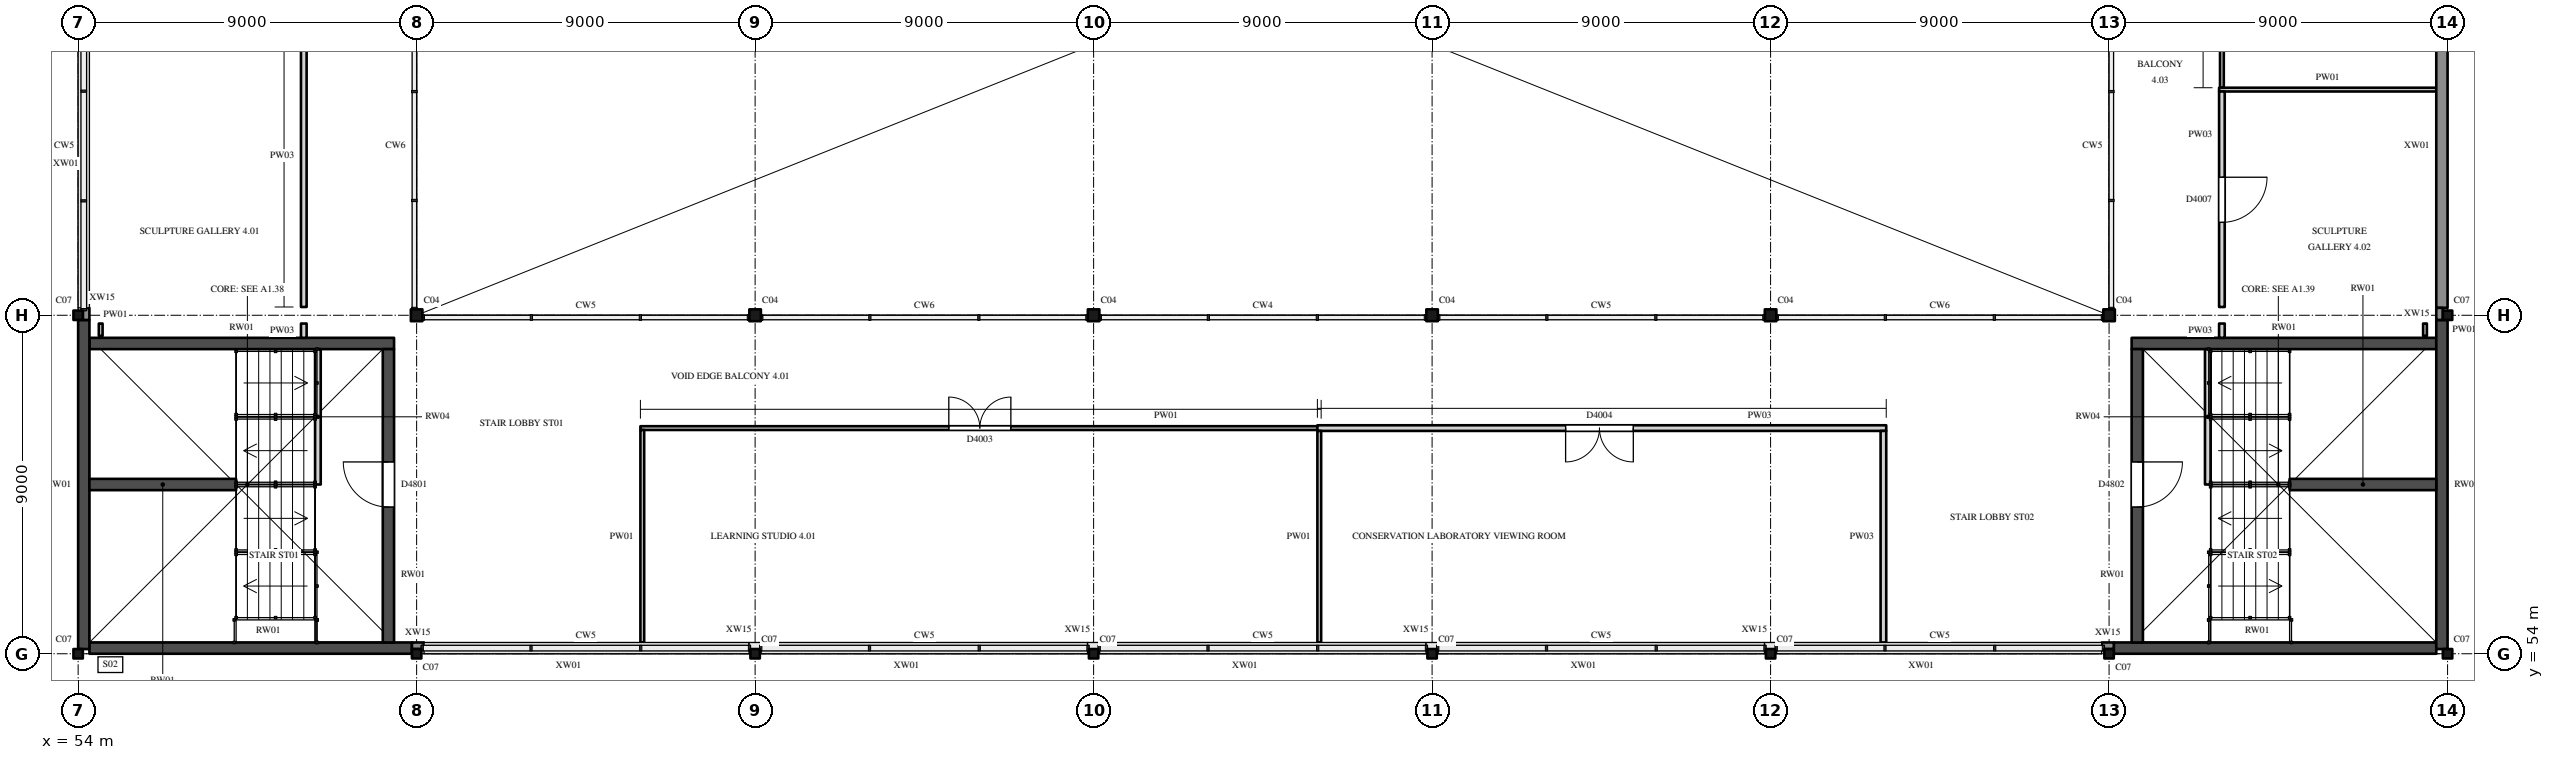
"""IFC4 building model, lengths in metres.
Left out: names, types, materials, properties, quantities, classifications, styles, units other than length and angle.
Written with IfcOpenShell. Run it as: python <this file> out.ifc"""

import sys

from ifc_helpers import new_model, si_unit, direction, frame, frame_2d, origin, origin_2d, place, context, subcontext, project, spatial, rectangle, hollow_rectangle, i_section, extrude, element, fill, save


model = new_model("IFC4")
c1 = context("Model", 3, precision=1e-05, world=origin(), true_north=direction((0.0, 1.0)))
c2 = subcontext(c1, "Body", "Model", "MODEL_VIEW")
j1 = project(units=[si_unit("LENGTHUNIT", "METRE"), si_unit("PLANEANGLEUNIT", "RADIAN")], contexts=[c1])
p1 = place(None, origin())
s1 = spatial("IfcSite", under=j1, at=p1, CompositionType="ELEMENT")
p2 = place(p1, origin())
s2 = spatial("IfcBuilding", under=s1, at=p2, CompositionType="ELEMENT")
p3 = place(p2, frame((0.0, 0.0, 26.0)))
s3 = spatial("IfcBuildingStorey", under=s2, at=p3, CompositionType="ELEMENT", Elevation=26.0)
for number, where, z_axis, x_axis in (
    (1, (54.0, 54.0, 0.0), (0.0, 0.0, 1.0), (1.0, 0.0, 0.0)),
    (2, (63.0, 54.0, 0.0), (0.0, 0.0, 1.0), (1.0, 0.0, 0.0)),
    (3, (72.0, 54.0, 0.0), (0.0, 0.0, 1.0), (1.0, 0.0, 0.0)),
    (4, (81.0, 54.0, 0.0), (0.0, 0.0, 1.0), (1.0, 0.0, 0.0)),
    (5, (90.0, 54.0, 0.0), (0.0, 0.0, 1.0), (1.0, 0.0, 0.0)),
    (6, (99.0, 54.0, 0.0), (0.0, 0.0, 1.0), (1.0, 0.0, 0.0)),
    (7, (108.0, 54.0, 0.0), (0.0, 0.0, 1.0), (1.0, 0.0, 0.0)),
    (8, (117.0, 54.0, 0.0), (0.0, 0.0, 1.0), (1.0, 0.0, 0.0)),
    (9, (54.0, 63.0, 0.0), (0.0, 0.0, 1.0), (1.0, 0.0, 0.0)),
):
    element("IfcColumn", number, at=place(p3, frame(where, z_axis=z_axis, x_axis=x_axis)), inside=s3, PredefinedType="COLUMN", context=c2, shape_type="SweptSolid", body=[
        extrude(hollow_rectangle(XDim=0.25, YDim=0.25, WallThickness=0.009, InnerFilletRadius=0.013, OuterFilletRadius=0.022, at=origin_2d()), origin(), (0.0, 0.0, 1.0), 5.0),
    ])
for number, where, z_axis, x_axis in (
    (10, (63.0, 63.0, 0.0), (0.0, 0.0, 1.0), (1.0, 0.0, 0.0)),
    (11, (72.0, 63.0, 0.0), (0.0, 0.0, 1.0), (1.0, 0.0, 0.0)),
    (12, (81.0, 63.0, 0.0), (0.0, 0.0, 1.0), (1.0, 0.0, 0.0)),
    (13, (90.0, 63.0, 0.0), (0.0, 0.0, 1.0), (1.0, 0.0, 0.0)),
    (14, (99.0, 63.0, 0.0), (0.0, 0.0, 1.0), (1.0, 0.0, 0.0)),
    (15, (108.0, 63.0, 0.0), (0.0, 0.0, 1.0), (1.0, 0.0, 0.0)),
):
    element("IfcColumn", number, at=place(p3, frame(where, z_axis=z_axis, x_axis=x_axis)), inside=s3, PredefinedType="COLUMN", context=c2, shape_type="SweptSolid", body=[
        extrude(i_section(OverallWidth=0.307, OverallDepth=0.315, WebThickness=0.012, FlangeThickness=0.019, FilletRadius=0.017, at=origin_2d()), origin(), (0.0, 0.0, 1.0), 5.0),
    ])
p4 = place(p3, frame((117.0, 63.0, 0.0), z_axis=(0.0, 0.0, 1.0), x_axis=(1.0, 0.0, 0.0)))
e16 = element("IfcColumn", 16, at=p4, inside=s3, PredefinedType="COLUMN", context=c2, shape_type="SweptSolid", body=[
    extrude(hollow_rectangle(XDim=0.25, YDim=0.25, WallThickness=0.009, InnerFilletRadius=0.013, OuterFilletRadius=0.022, at=origin_2d()), origin(), (0.0, 0.0, 1.0), 5.0),
])
p5 = place(p3, frame((54.3, 54.15, 0.0), z_axis=(0.0, 0.0, 1.0), x_axis=(1.0, 0.0, 0.0)))
e17 = element("IfcWall", 17, at=p5, inside=s3, PredefinedType="SHEAR", context=c2, shape_type="SweptSolid", body=[
    extrude(rectangle(XDim=8.575, YDim=0.3, at=frame_2d((4.288, 0.0))), origin(), (0.0, 0.0, 1.0), 5.0),
])
p6 = place(p3, frame((54.3, 62.25, 0.0), z_axis=(0.0, 0.0, 1.0), x_axis=(1.0, 0.0, 0.0)))
e18 = element("IfcWall", 18, at=p6, inside=s3, PredefinedType="SHEAR", context=c2, shape_type="SweptSolid", body=[
    extrude(rectangle(XDim=8.1, YDim=0.3, at=frame_2d((4.05, 0.0))), origin(), (0.0, 0.0, 1.0), 5.0),
])
p7 = place(p3, frame((54.15, 54.125, 0.0), z_axis=(0.0, 0.0, 1.0), x_axis=(0.0, 1.0, 0.0)))
e19 = element("IfcWall", 19, at=p7, inside=s3, PredefinedType="SHEAR", context=c2, shape_type="SweptSolid", body=[
    extrude(rectangle(XDim=8.75, YDim=0.3, at=frame_2d((4.375, 0.0))), origin(), (0.0, 0.0, 1.0), 5.0),
])
p8 = place(p3, frame((62.25, 54.3, 0.0), z_axis=(0.0, 0.0, 1.0), x_axis=(0.0, 1.0, 0.0)))
e20 = element("IfcWall", 20, at=p8, inside=s3, PredefinedType="SHEAR", context=c2, shape_type="SweptSolid", body=[
    extrude(rectangle(XDim=7.8, YDim=0.3, at=frame_2d((3.9, 0.0))), origin(), (0.0, 0.0, 1.0), 5.0),
])
p9 = place(p8, frame((3.6, 0.0, 0.0)))
e21 = element("IfcOpeningElement", 21, at=p9, cuts=e20, PredefinedType="OPENING", context=c2, shape_type="SweptSolid", body=[
    extrude(rectangle(XDim=1.2, YDim=2.1, at=frame_2d((0.6, 1.05))), frame((0.0, 0.16, 0.0), z_axis=(0.0, -1.0, 0.0), x_axis=(1.0, 0.0, 0.0)), (0.0, 0.0, 1.0), 0.32),
])
p10 = place(p3, frame((108.125, 54.15, 0.0), z_axis=(0.0, 0.0, 1.0), x_axis=(1.0, 0.0, 0.0)))
e22 = element("IfcWall", 22, at=p10, inside=s3, PredefinedType="SHEAR", context=c2, shape_type="SweptSolid", body=[
    extrude(rectangle(XDim=8.575, YDim=0.3, at=frame_2d((4.288, 0.0))), origin(), (0.0, 0.0, 1.0), 5.0),
])
p11 = place(p3, frame((108.6, 62.25, 0.0), z_axis=(0.0, 0.0, 1.0), x_axis=(1.0, 0.0, 0.0)))
e23 = element("IfcWall", 23, at=p11, inside=s3, PredefinedType="SHEAR", context=c2, shape_type="SweptSolid", body=[
    extrude(rectangle(XDim=8.1, YDim=0.3, at=frame_2d((4.05, 0.0))), origin(), (0.0, 0.0, 1.0), 5.0),
])
p12 = place(p3, frame((108.75, 54.3, 0.0), z_axis=(0.0, 0.0, 1.0), x_axis=(0.0, 1.0, 0.0)))
e24 = element("IfcWall", 24, at=p12, inside=s3, PredefinedType="SHEAR", context=c2, shape_type="SweptSolid", body=[
    extrude(rectangle(XDim=7.8, YDim=0.3, at=frame_2d((3.9, 0.0))), origin(), (0.0, 0.0, 1.0), 5.0),
])
p13 = place(p12, frame((3.6, 0.0, 0.0)))
e25 = element("IfcOpeningElement", 25, at=p13, cuts=e24, PredefinedType="OPENING", context=c2, shape_type="SweptSolid", body=[
    extrude(rectangle(XDim=1.2, YDim=2.1, at=frame_2d((0.6, 1.05))), frame((0.0, 0.16, 0.0), z_axis=(0.0, -1.0, 0.0), x_axis=(1.0, 0.0, 0.0)), (0.0, 0.0, 1.0), 0.32),
])
p14 = place(p3, frame((116.85, 54.125, 0.0), z_axis=(0.0, 0.0, 1.0), x_axis=(0.0, 1.0, 0.0)))
e26 = element("IfcWall", 26, at=p14, inside=s3, PredefinedType="SHEAR", context=c2, shape_type="SweptSolid", body=[
    extrude(rectangle(XDim=8.75, YDim=0.3, at=frame_2d((4.375, 0.0))), origin(), (0.0, 0.0, 1.0), 5.0),
])
p15 = place(p3, frame((58.2, 58.5, 0.0), z_axis=(0.0, 0.0, 1.0), x_axis=(-1.0, 0.0, 0.0)))
e27 = element("IfcWall", 27, at=p15, inside=s3, PredefinedType="SHEAR", context=c2, shape_type="SweptSolid", body=[
    extrude(rectangle(XDim=3.9, YDim=0.3, at=frame_2d((1.95, 0.0))), origin(), (0.0, 0.0, 1.0), 5.0),
])
p16 = place(p3, frame((60.375, 58.5, 0.0), z_axis=(0.0, 0.0, 1.0), x_axis=(0.0, 1.0, 0.0)))
e28 = element("IfcWall", 28, at=p16, inside=s3, PredefinedType="STANDARD", context=c2, shape_type="SweptSolid", body=[
    extrude(rectangle(XDim=3.6, YDim=0.15, at=frame_2d((1.8, 0.0))), origin(), (0.0, 0.0, 1.0), 2.3),
])
p17 = place(p3, frame((112.8, 58.5, 0.0), z_axis=(0.0, 0.0, 1.0), x_axis=(1.0, 0.0, 0.0)))
e29 = element("IfcWall", 29, at=p17, inside=s3, PredefinedType="SHEAR", context=c2, shape_type="SweptSolid", body=[
    extrude(rectangle(XDim=3.9, YDim=0.3, at=frame_2d((1.95, 0.0))), origin(), (0.0, 0.0, 1.0), 5.0),
])
p18 = place(p3, frame((110.625, 58.5, 0.0), z_axis=(0.0, 0.0, 1.0), x_axis=(0.0, 1.0, 0.0)))
e30 = element("IfcWall", 30, at=p18, inside=s3, PredefinedType="STANDARD", context=c2, shape_type="SweptSolid", body=[
    extrude(rectangle(XDim=3.6, YDim=0.15, at=frame_2d((1.8, 0.0))), origin(), (0.0, 0.0, 1.0), 2.3),
])
p19 = place(p3, frame((63.197, 54.15, 0.0), z_axis=(0.0, 0.0, 1.0), x_axis=(1.0, 0.0, 0.0)))
e31 = element("IfcWall", 31, at=p19, inside=s3, PredefinedType="SOLIDWALL", context=c2, shape_type="SweptSolid", body=[
    extrude(rectangle(XDim=8.642, YDim=0.3, at=frame_2d((4.321, 0.0))), origin(), (0.0, 0.0, 1.0), 1.1),
])
for number, where, z_axis, x_axis in (
    (32, (72.161, 54.15, 0.0), (0.0, 0.0, 1.0), (1.0, 0.0, 0.0)),
    (33, (81.161, 54.15, 0.0), (0.0, 0.0, 1.0), (1.0, 0.0, 0.0)),
    (34, (90.161, 54.15, 0.0), (0.0, 0.0, 1.0), (1.0, 0.0, 0.0)),
):
    element("IfcWall", number, at=place(p3, frame(where, z_axis=z_axis, x_axis=x_axis)), inside=s3, PredefinedType="SOLIDWALL", context=c2, shape_type="SweptSolid", body=[
        extrude(rectangle(XDim=8.678, YDim=0.3, at=frame_2d((4.339, 0.0))), origin(), (0.0, 0.0, 1.0), 1.1),
    ])
for number, where, z_axis, x_axis in (
    (35, (99.161, 54.15, 0.0), (0.0, 0.0, 1.0), (1.0, 0.0, 0.0)),
    (36, (54.15, 63.197, 0.0), (0.0, 0.0, 1.0), (0.0, 1.0, 0.0)),
):
    element("IfcWall", number, at=place(p3, frame(where, z_axis=z_axis, x_axis=x_axis)), inside=s3, PredefinedType="SOLIDWALL", context=c2, shape_type="SweptSolid", body=[
        extrude(rectangle(XDim=8.642, YDim=0.3, at=frame_2d((4.321, 0.0))), origin(), (0.0, 0.0, 1.0), 1.1),
    ])
p20 = place(p3, frame((116.85, 63.197, 0.0), z_axis=(0.0, 0.0, 1.0), x_axis=(0.0, 1.0, 0.0)))
e37 = element("IfcWall", 37, at=p20, inside=s3, PredefinedType="SOLIDWALL", context=c2, shape_type="SweptSolid", body=[
    extrude(rectangle(XDim=8.642, YDim=0.3, at=frame_2d((4.321, 0.0))), origin(), (0.0, 0.0, 1.0), 4.419),
])
p21 = place(p3, frame((62.875, 54.212, 0.0), z_axis=(0.0, 0.0, 1.0), x_axis=(1.0, 0.0, 0.0)))
e38 = element("IfcWall", 38, at=p21, inside=s3, PredefinedType="SOLIDWALL", context=c2, shape_type="SweptSolid", body=[
    extrude(rectangle(XDim=0.322, YDim=0.175, at=frame_2d((0.161, 0.0))), origin(), (0.0, 0.0, 1.0), 5.0),
])
for number, where, z_axis, x_axis in (
    (39, (71.839, 54.212, 0.0), (0.0, 0.0, 1.0), (1.0, 0.0, 0.0)),
    (40, (80.839, 54.212, 0.0), (0.0, 0.0, 1.0), (1.0, 0.0, 0.0)),
    (41, (89.839, 54.212, 0.0), (0.0, 0.0, 1.0), (1.0, 0.0, 0.0)),
    (42, (98.839, 54.212, 0.0), (0.0, 0.0, 1.0), (1.0, 0.0, 0.0)),
):
    element("IfcWall", number, at=place(p3, frame(where, z_axis=z_axis, x_axis=x_axis)), inside=s3, PredefinedType="SOLIDWALL", context=c2, shape_type="SweptSolid", body=[
        extrude(rectangle(XDim=0.322, YDim=0.175, at=frame_2d((0.161, 0.0))), origin(), (0.0, 0.0, 1.0), 1.1),
    ])
for number, where, z_axis, x_axis in (
    (43, (107.803, 54.212, 0.0), (0.0, 0.0, 1.0), (1.0, 0.0, 0.0)),
    (44, (54.212, 62.875, 0.0), (0.0, 0.0, 1.0), (0.0, 1.0, 0.0)),
    (45, (116.788, 62.875, 0.0), (0.0, 0.0, 1.0), (0.0, 1.0, 0.0)),
):
    element("IfcWall", number, at=place(p3, frame(where, z_axis=z_axis, x_axis=x_axis)), inside=s3, PredefinedType="SOLIDWALL", context=c2, shape_type="SweptSolid", body=[
        extrude(rectangle(XDim=0.322, YDim=0.175, at=frame_2d((0.161, 0.0))), origin(), (0.0, 0.0, 1.0), 5.0),
    ])
p22 = place(p3, frame((68.95, 60.0, 0.0), z_axis=(0.0, 0.0, 1.0), x_axis=(1.0, 0.0, 0.0)))
e46 = element("IfcWall", 46, at=p22, inside=s3, PredefinedType="PARTITIONING", context=c2, shape_type="SweptSolid", body=[
    extrude(rectangle(XDim=18.1, YDim=0.1, at=frame_2d((9.05, 0.0))), origin(), (0.0, 0.0, 1.0), 4.521),
])
p23 = place(p22, frame((8.2, 0.0, 0.0)))
e47 = element("IfcOpeningElement", 47, at=p23, cuts=e46, PredefinedType="OPENING", context=c2, shape_type="SweptSolid", body=[
    extrude(rectangle(XDim=1.65, YDim=2.1, at=frame_2d((0.825, 1.05))), frame((0.0, 0.06, 0.0), z_axis=(0.0, -1.0, 0.0), x_axis=(1.0, 0.0, 0.0)), (0.0, 0.0, 1.0), 0.12),
])
p24 = place(p3, frame((86.95, 60.0, 0.0), z_axis=(0.0, 0.0, 1.0), x_axis=(1.0, 0.0, 0.0)))
e48 = element("IfcWall", 48, at=p24, inside=s3, PredefinedType="PARTITIONING", context=c2, shape_type="SweptSolid", body=[
    extrude(rectangle(XDim=15.125, YDim=0.15, at=frame_2d((7.562, 0.0))), origin(), (0.0, 0.0, 1.0), 4.521),
])
p25 = place(p24, frame((6.6, 0.0, 0.0)))
e49 = element("IfcOpeningElement", 49, at=p25, cuts=e48, PredefinedType="OPENING", context=c2, shape_type="SweptSolid", body=[
    extrude(rectangle(XDim=1.8, YDim=2.1, at=frame_2d((0.9, 1.05))), frame((0.0, 0.085, 0.0), z_axis=(0.0, -1.0, 0.0), x_axis=(1.0, 0.0, 0.0)), (0.0, 0.0, 1.0), 0.17),
])
p26 = place(p3, frame((110.925, 69.0, 0.0), z_axis=(0.0, 0.0, 1.0), x_axis=(1.0, 0.0, 0.0)))
e50 = element("IfcWall", 50, at=p26, inside=s3, PredefinedType="PARTITIONING", context=c2, shape_type="SweptSolid", body=[
    extrude(rectangle(XDim=5.775, YDim=0.1, at=frame_2d((2.887, 0.0))), origin(), (0.0, 0.0, 1.0), 4.521),
])
p27 = place(p3, frame((54.6, 62.45, 0.0), z_axis=(0.0, 0.0, 1.0), x_axis=(0.0, 1.0, 0.0)))
e51 = element("IfcWall", 51, at=p27, inside=s3, PredefinedType="PARTITIONING", context=c2, shape_type="SweptSolid", body=[
    extrude(rectangle(XDim=0.33, YDim=0.1, at=frame_2d((0.165, 0.0))), origin(), (0.0, 0.0, 1.0), 4.825),
])
p28 = place(p3, frame((60.0, 62.4, 0.0), z_axis=(0.0, 0.0, 1.0), x_axis=(0.0, 1.0, 0.0)))
e52 = element("IfcWall", 52, at=p28, inside=s3, PredefinedType="PARTITIONING", context=c2, shape_type="SweptSolid", body=[
    extrude(rectangle(XDim=0.38, YDim=0.15, at=frame_2d((0.19, 0.0))), origin(), (0.0, 0.0, 1.0), 4.825),
])
p29 = place(p3, frame((60.0, 63.22, 0.0), z_axis=(0.0, 0.0, 1.0), x_axis=(0.0, 1.0, 0.0)))
e53 = element("IfcWall", 53, at=p29, inside=s3, PredefinedType="PARTITIONING", context=c2, shape_type="SweptSolid", body=[
    extrude(rectangle(XDim=17.56, YDim=0.15, at=frame_2d((8.78, 0.0))), origin(), (0.0, 0.0, 1.0), 4.825),
])
p30 = place(p29, frame((8.05, 0.0, 0.0)))
e54 = element("IfcOpeningElement", 54, at=p30, cuts=e53, PredefinedType="OPENING", context=c2, shape_type="SweptSolid", body=[
    extrude(rectangle(XDim=1.5, YDim=2.4, at=frame_2d((0.75, 1.2))), frame((0.0, 0.085, 0.0), z_axis=(0.0, -1.0, 0.0), x_axis=(1.0, 0.0, 0.0)), (0.0, 0.0, 1.0), 0.17),
])
p31 = place(p3, frame((69.0, 54.3, 0.0), z_axis=(0.0, 0.0, 1.0), x_axis=(0.0, 1.0, 0.0)))
e55 = element("IfcWall", 55, at=p31, inside=s3, PredefinedType="PARTITIONING", context=c2, shape_type="SweptSolid", body=[
    extrude(rectangle(XDim=5.65, YDim=0.1, at=frame_2d((2.825, 0.0))), origin(), (0.0, 0.0, 1.0), 4.825),
])
p32 = place(p3, frame((87.0, 54.3, 0.0), z_axis=(0.0, 0.0, 1.0), x_axis=(0.0, 1.0, 0.0)))
e56 = element("IfcWall", 56, at=p32, inside=s3, PredefinedType="PARTITIONING", context=c2, shape_type="SweptSolid", body=[
    extrude(rectangle(XDim=5.625, YDim=0.1, at=frame_2d((2.812, 0.0))), origin(), (0.0, 0.0, 1.0), 4.825),
])
p33 = place(p3, frame((102.0, 54.3, 0.0), z_axis=(0.0, 0.0, 1.0), x_axis=(0.0, 1.0, 0.0)))
e57 = element("IfcWall", 57, at=p33, inside=s3, PredefinedType="PARTITIONING", context=c2, shape_type="SweptSolid", body=[
    extrude(rectangle(XDim=5.625, YDim=0.15, at=frame_2d((2.812, 0.0))), origin(), (0.0, 0.0, 1.0), 4.825),
])
p34 = place(p3, frame((111.0, 62.4, 0.0), z_axis=(0.0, 0.0, 1.0), x_axis=(0.0, 1.0, 0.0)))
e58 = element("IfcWall", 58, at=p34, inside=s3, PredefinedType="PARTITIONING", context=c2, shape_type="SweptSolid", body=[
    extrude(rectangle(XDim=0.38, YDim=0.15, at=frame_2d((0.19, 0.0))), origin(), (0.0, 0.0, 1.0), 4.825),
])
p35 = place(p3, frame((111.0, 63.22, 0.0), z_axis=(0.0, 0.0, 1.0), x_axis=(0.0, 1.0, 0.0)))
e59 = element("IfcWall", 59, at=p35, inside=s3, PredefinedType="PARTITIONING", context=c2, shape_type="SweptSolid", body=[
    extrude(rectangle(XDim=5.73, YDim=0.15, at=frame_2d((2.865, 0.0))), origin(), (0.0, 0.0, 1.0), 4.825),
])
p36 = place(p35, frame((2.25, 0.0, 0.0)))
e60 = element("IfcOpeningElement", 60, at=p36, cuts=e59, PredefinedType="OPENING", context=c2, shape_type="SweptSolid", body=[
    extrude(rectangle(XDim=1.2, YDim=2.4, at=frame_2d((0.6, 1.2))), frame((0.0, 0.085, 0.0), z_axis=(0.0, -1.0, 0.0), x_axis=(1.0, 0.0, 0.0)), (0.0, 0.0, 1.0), 0.17),
])
p37 = place(p3, frame((111.0, 69.05, 0.0), z_axis=(0.0, 0.0, 1.0), x_axis=(0.0, 1.0, 0.0)))
e61 = element("IfcWall", 61, at=p37, inside=s3, PredefinedType="PARTITIONING", context=c2, shape_type="SweptSolid", body=[
    extrude(rectangle(XDim=11.73, YDim=0.1, at=frame_2d((5.865, 0.0))), origin(), (0.0, 0.0, 1.0), 4.825),
])
p38 = place(p37, frame((5.35, 0.0, 0.0)))
e62 = element("IfcOpeningElement", 62, at=p38, cuts=e61, PredefinedType="OPENING", context=c2, shape_type="SweptSolid", body=[
    extrude(rectangle(XDim=1.1, YDim=2.4, at=frame_2d((0.55, 1.2))), frame((0.0, 0.06, 0.0), z_axis=(0.0, -1.0, 0.0), x_axis=(1.0, 0.0, 0.0)), (0.0, 0.0, 1.0), 0.12),
])
p39 = place(p3, frame((116.4, 62.45, 0.0), z_axis=(0.0, 0.0, 1.0), x_axis=(0.0, 1.0, 0.0)))
e63 = element("IfcWall", 63, at=p39, inside=s3, PredefinedType="PARTITIONING", context=c2, shape_type="SweptSolid", body=[
    extrude(rectangle(XDim=0.33, YDim=0.1, at=frame_2d((0.165, 0.0))), origin(), (0.0, 0.0, 1.0), 4.825),
])
p40 = place(p9, origin())
e64 = element("IfcDoor", 64, at=p40, inside=s3, OperationType="SINGLE_SWING_LEFT", PredefinedType="DOOR", context=c2, shape_type="SweptSolid", body=[
    extrude(rectangle(XDim=1.2, YDim=2.1, at=frame_2d((0.6, 1.05))), frame((0.0, 0.025, 0.0), z_axis=(0.0, -1.0, 0.0), x_axis=(1.0, 0.0, 0.0)), (0.0, 0.0, 1.0), 0.05),
])
fill(e21, e64)
p41 = place(p13, origin())
e65 = element("IfcDoor", 65, at=p41, inside=s3, OperationType="SINGLE_SWING_RIGHT", PredefinedType="DOOR", context=c2, shape_type="SweptSolid", body=[
    extrude(rectangle(XDim=1.2, YDim=2.1, at=frame_2d((0.6, 1.05))), frame((0.0, 0.025, 0.0), z_axis=(0.0, -1.0, 0.0), x_axis=(1.0, 0.0, 0.0)), (0.0, 0.0, 1.0), 0.05),
])
fill(e25, e65)
p42 = place(p23, origin())
e66 = element("IfcDoor", 66, at=p42, inside=s3, OperationType="DOUBLE_DOOR_SINGLE_SWING", PredefinedType="DOOR", context=c2, shape_type="SweptSolid", body=[
    extrude(rectangle(XDim=1.65, YDim=2.1, at=frame_2d((0.825, 1.05))), frame((0.0, 0.025, 0.0), z_axis=(0.0, -1.0, 0.0), x_axis=(1.0, 0.0, 0.0)), (0.0, 0.0, 1.0), 0.05),
])
fill(e47, e66)
p43 = place(p25, origin())
e67 = element("IfcDoor", 67, at=p43, inside=s3, OperationType="DOUBLE_DOOR_SINGLE_SWING", PredefinedType="DOOR", context=c2, shape_type="SweptSolid", body=[
    extrude(rectangle(XDim=1.8, YDim=2.1, at=frame_2d((0.9, 1.05))), frame((0.0, 0.025, 0.0), z_axis=(0.0, -1.0, 0.0), x_axis=(1.0, 0.0, 0.0)), (0.0, 0.0, 1.0), 0.05),
])
fill(e49, e67)
p44 = place(p36, origin())
e68 = element("IfcDoor", 68, at=p44, inside=s3, OperationType="SINGLE_SWING_RIGHT", PredefinedType="DOOR", context=c2, shape_type="SweptSolid", body=[
    extrude(rectangle(XDim=1.2, YDim=2.4, at=frame_2d((0.6, 1.2))), frame((0.0, 0.025, 0.0), z_axis=(0.0, -1.0, 0.0), x_axis=(1.0, 0.0, 0.0)), (0.0, 0.0, 1.0), 0.05),
])
fill(e60, e68)
save(model, sys.argv[1])
